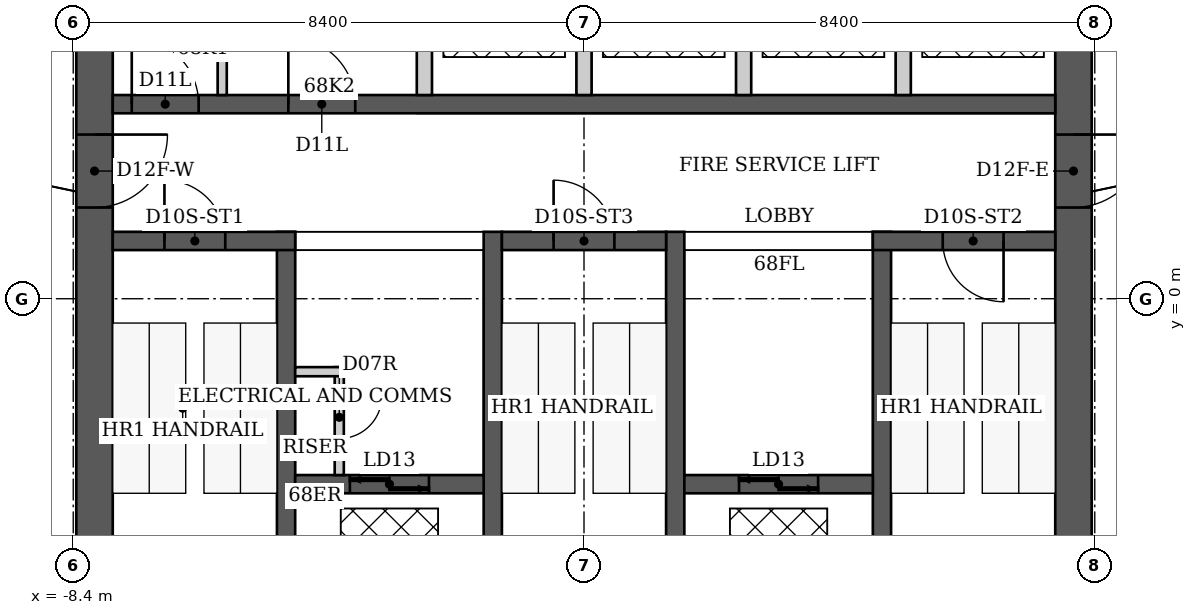
"""IFC4 building model, lengths in metres.
Left out: names, types, materials, properties, quantities, classifications, styles, units other than length and angle.
Written with IfcOpenShell. Run it as: python <this file> out.ifc"""

import sys

from ifc_helpers import new_model, si_unit, direction, frame, frame_2d, origin, place, context, subcontext, project, spatial, rectangle, extrude, element, fill, save


model = new_model("IFC4")
c1 = context("Model", 3, precision=1e-05, world=origin(), true_north=direction((0.0, 1.0)))
c2 = subcontext(c1, "Body", "Model", "MODEL_VIEW")
j1 = project(units=[si_unit("LENGTHUNIT", "METRE"), si_unit("PLANEANGLEUNIT", "RADIAN")], contexts=[c1])
p1 = place(None, origin())
s1 = spatial("IfcSite", under=j1, at=p1, CompositionType="ELEMENT")
p2 = place(p1, origin())
s2 = spatial("IfcBuilding", under=s1, at=p2, CompositionType="ELEMENT")
p3 = place(p2, frame((0.0, 0.0, 272.2)))
s3 = spatial("IfcBuildingStorey", under=s2, at=p3, CompositionType="ELEMENT", Elevation=272.2)
p4 = place(p3, frame((-8.05, -6.1, 0.0), z_axis=(0.0, 0.0, 1.0), x_axis=(0.0, 1.0, 0.0)))
e1 = element("IfcWall", 1, at=p4, inside=s3, PredefinedType="SHEAR", context=c2, shape_type="SweptSolid", body=[
    extrude(rectangle(XDim=12.2, YDim=0.6, at=frame_2d((6.1, 0.0))), origin(), (0.0, 0.0, 1.0), 3.8),
])
p5 = place(p4, frame((7.6, 0.0, 0.0)))
e2 = element("IfcOpeningElement", 2, at=p5, cuts=e1, PredefinedType="OPENING", context=c2, shape_type="SweptSolid", body=[
    extrude(rectangle(XDim=1.2, YDim=2.2, at=frame_2d((0.6, 1.1))), frame((0.0, 0.3, 0.0), z_axis=(0.0, -1.0, 0.0), x_axis=(1.0, 0.0, 0.0)), (0.0, 0.0, 1.0), 0.6),
])
p6 = place(p3, frame((8.05, -6.1, 0.0), z_axis=(0.0, 0.0, 1.0), x_axis=(0.0, 1.0, 0.0)))
e3 = element("IfcWall", 3, at=p6, inside=s3, PredefinedType="SHEAR", context=c2, shape_type="SweptSolid", body=[
    extrude(rectangle(XDim=12.2, YDim=0.6, at=frame_2d((6.1, 0.0))), origin(), (0.0, 0.0, 1.0), 3.8),
])
p7 = place(p6, frame((7.6, 0.0, 0.0)))
e4 = element("IfcOpeningElement", 4, at=p7, cuts=e3, PredefinedType="OPENING", context=c2, shape_type="SweptSolid", body=[
    extrude(rectangle(XDim=1.2, YDim=2.2, at=frame_2d((0.6, 1.1))), frame((0.0, 0.3, 0.0), z_axis=(0.0, -1.0, 0.0), x_axis=(1.0, 0.0, 0.0)), (0.0, 0.0, 1.0), 0.6),
])
for number, where, z_axis, x_axis in (
    (5, (-4.9, -6.1, 0.0), (0.0, 0.0, 1.0), (0.0, 1.0, 0.0)),
    (6, (-1.5, -6.1, 0.0), (0.0, 0.0, 1.0), (0.0, 1.0, 0.0)),
    (7, (1.5, -6.1, 0.0), (0.0, 0.0, 1.0), (0.0, 1.0, 0.0)),
    (8, (4.9, -6.1, 0.0), (0.0, 0.0, 1.0), (0.0, 1.0, 0.0)),
):
    element("IfcWall", number, at=place(p3, frame(where, z_axis=z_axis, x_axis=x_axis)), inside=s3, PredefinedType="SHEAR", context=c2, shape_type="SweptSolid", body=[
        extrude(rectangle(XDim=7.2, YDim=0.3, at=frame_2d((3.6, 0.0))), origin(), (0.0, 0.0, 1.0), 3.8),
    ])
p8 = place(p3, frame((-7.75, 0.95, 0.0), z_axis=(0.0, 0.0, 1.0), x_axis=(1.0, 0.0, 0.0)))
e9 = element("IfcWall", 9, at=p8, inside=s3, PredefinedType="SHEAR", context=c2, shape_type="SweptSolid", body=[
    extrude(rectangle(XDim=3.0, YDim=0.3, at=frame_2d((1.5, 0.0))), origin(), (0.0, 0.0, 1.0), 3.8),
])
p9 = place(p8, frame((0.85, 0.0, 0.0)))
e10 = element("IfcOpeningElement", 10, at=p9, cuts=e9, PredefinedType="OPENING", context=c2, shape_type="SweptSolid", body=[
    extrude(rectangle(XDim=1.0, YDim=2.2, at=frame_2d((0.5, 1.1))), frame((0.0, 0.15, 0.0), z_axis=(0.0, -1.0, 0.0), x_axis=(1.0, 0.0, 0.0)), (0.0, 0.0, 1.0), 0.3),
])
p10 = place(p3, frame((-1.35, 0.95, 0.0), z_axis=(0.0, 0.0, 1.0), x_axis=(1.0, 0.0, 0.0)))
e11 = element("IfcWall", 11, at=p10, inside=s3, PredefinedType="SHEAR", context=c2, shape_type="SweptSolid", body=[
    extrude(rectangle(XDim=2.7, YDim=0.3, at=frame_2d((1.35, 0.0))), origin(), (0.0, 0.0, 1.0), 3.8),
])
p11 = place(p10, frame((0.85, 0.0, 0.0)))
e12 = element("IfcOpeningElement", 12, at=p11, cuts=e11, PredefinedType="OPENING", context=c2, shape_type="SweptSolid", body=[
    extrude(rectangle(XDim=1.0, YDim=2.2, at=frame_2d((0.5, 1.1))), frame((0.0, 0.15, 0.0), z_axis=(0.0, -1.0, 0.0), x_axis=(1.0, 0.0, 0.0)), (0.0, 0.0, 1.0), 0.3),
])
p12 = place(p3, frame((4.75, 0.95, 0.0), z_axis=(0.0, 0.0, 1.0), x_axis=(1.0, 0.0, 0.0)))
e13 = element("IfcWall", 13, at=p12, inside=s3, PredefinedType="SHEAR", context=c2, shape_type="SweptSolid", body=[
    extrude(rectangle(XDim=3.0, YDim=0.3, at=frame_2d((1.5, 0.0))), origin(), (0.0, 0.0, 1.0), 3.8),
])
p13 = place(p12, frame((1.15, 0.0, 0.0)))
e14 = element("IfcOpeningElement", 14, at=p13, cuts=e13, PredefinedType="OPENING", context=c2, shape_type="SweptSolid", body=[
    extrude(rectangle(XDim=1.0, YDim=2.2, at=frame_2d((0.5, 1.1))), frame((0.0, 0.15, 0.0), z_axis=(0.0, -1.0, 0.0), x_axis=(1.0, 0.0, 0.0)), (0.0, 0.0, 1.0), 0.3),
])
p14 = place(p3, frame((-4.75, -3.05, 0.0), z_axis=(0.0, 0.0, 1.0), x_axis=(1.0, 0.0, 0.0)))
e15 = element("IfcWall", 15, at=p14, inside=s3, PredefinedType="SHEAR", context=c2, shape_type="SweptSolid", body=[
    extrude(rectangle(XDim=3.1, YDim=0.3, at=frame_2d((1.55, 0.0))), origin(), (0.0, 0.0, 1.0), 3.8),
])
p15 = place(p14, frame((0.9, 0.0, 0.0)))
e16 = element("IfcOpeningElement", 16, at=p15, cuts=e15, PredefinedType="OPENING", context=c2, shape_type="SweptSolid", body=[
    extrude(rectangle(XDim=1.3, YDim=2.1, at=frame_2d((0.65, 1.05))), frame((0.0, 0.15, 0.0), z_axis=(0.0, -1.0, 0.0), x_axis=(1.0, 0.0, 0.0)), (0.0, 0.0, 1.0), 0.3),
])
p16 = place(p3, frame((1.65, -3.05, 0.0), z_axis=(0.0, 0.0, 1.0), x_axis=(1.0, 0.0, 0.0)))
e17 = element("IfcWall", 17, at=p16, inside=s3, PredefinedType="SHEAR", context=c2, shape_type="SweptSolid", body=[
    extrude(rectangle(XDim=3.1, YDim=0.3, at=frame_2d((1.55, 0.0))), origin(), (0.0, 0.0, 1.0), 3.8),
])
p17 = place(p16, frame((0.9, 0.0, 0.0)))
e18 = element("IfcOpeningElement", 18, at=p17, cuts=e17, PredefinedType="OPENING", context=c2, shape_type="SweptSolid", body=[
    extrude(rectangle(XDim=1.3, YDim=2.1, at=frame_2d((0.65, 1.05))), frame((0.0, 0.15, 0.0), z_axis=(0.0, -1.0, 0.0), x_axis=(1.0, 0.0, 0.0)), (0.0, 0.0, 1.0), 0.3),
])
p18 = place(p3, frame((-7.75, 3.2, 0.0), z_axis=(0.0, 0.0, 1.0), x_axis=(1.0, 0.0, 0.0)))
e19 = element("IfcWall", 19, at=p18, inside=s3, PredefinedType="SHEAR", context=c2, shape_type="SweptSolid", body=[
    extrude(rectangle(XDim=15.5, YDim=0.3, at=frame_2d((7.75, 0.0))), origin(), (0.0, 0.0, 1.0), 3.8),
])
p19 = place(p18, frame((0.312, 0.0, 0.0)))
e20 = element("IfcOpeningElement", 20, at=p19, cuts=e19, PredefinedType="OPENING", context=c2, shape_type="SweptSolid", body=[
    extrude(rectangle(XDim=1.1, YDim=2.2, at=frame_2d((0.55, 1.1))), frame((0.0, 0.15, 0.0), z_axis=(0.0, -1.0, 0.0), x_axis=(1.0, 0.0, 0.0)), (0.0, 0.0, 1.0), 0.3),
])
p20 = place(p18, frame((2.887, 0.0, 0.0)))
e21 = element("IfcOpeningElement", 21, at=p20, cuts=e19, PredefinedType="OPENING", context=c2, shape_type="SweptSolid", body=[
    extrude(rectangle(XDim=1.1, YDim=2.2, at=frame_2d((0.55, 1.1))), frame((0.0, 0.15, 0.0), z_axis=(0.0, -1.0, 0.0), x_axis=(1.0, 0.0, 0.0)), (0.0, 0.0, 1.0), 0.3),
])
for number, where, z_axis, x_axis in (
    (22, (-2.625, 3.35, 0.0), (0.0, 0.0, 1.0), (0.0, 1.0, 0.0)),
    (23, (0.0, 3.35, 0.0), (0.0, 0.0, 1.0), (0.0, 1.0, 0.0)),
    (24, (2.625, 3.35, 0.0), (0.0, 0.0, 1.0), (0.0, 1.0, 0.0)),
    (25, (5.25, 3.35, 0.0), (0.0, 0.0, 1.0), (0.0, 1.0, 0.0)),
):
    element("IfcWall", number, at=place(p3, frame(where, z_axis=z_axis, x_axis=x_axis)), inside=s3, PredefinedType="PARTITIONING", context=c2, shape_type="SweptSolid", body=[
        extrude(rectangle(XDim=2.75, YDim=0.25, at=frame_2d((1.375, 0.0))), origin(), (0.0, 0.0, 1.0), 3.8),
    ])
p21 = place(p3, frame((-4.025, -2.9, 0.0), z_axis=(0.0, 0.0, 1.0), x_axis=(0.0, 1.0, 0.0)))
e26 = element("IfcWall", 26, at=p21, inside=s3, PredefinedType="PARTITIONING", context=c2, shape_type="SweptSolid", body=[
    extrude(rectangle(XDim=1.775, YDim=0.15, at=frame_2d((0.887, 0.0))), origin(), (0.0, 0.0, 1.0), 3.64),
])
p22 = place(p21, frame((0.6, 0.0, 0.0)))
e27 = element("IfcOpeningElement", 27, at=p22, cuts=e26, PredefinedType="OPENING", context=c2, shape_type="SweptSolid", body=[
    extrude(rectangle(XDim=0.7, YDim=2.1, at=frame_2d((0.35, 1.05))), frame((0.0, 0.075, 0.0), z_axis=(0.0, -1.0, 0.0), x_axis=(1.0, 0.0, 0.0)), (0.0, 0.0, 1.0), 0.15),
])
p23 = place(p3, frame((-4.75, -1.2, 0.0), z_axis=(0.0, 0.0, 1.0), x_axis=(1.0, 0.0, 0.0)))
e28 = element("IfcWall", 28, at=p23, inside=s3, PredefinedType="PARTITIONING", context=c2, shape_type="SweptSolid", body=[
    extrude(rectangle(XDim=0.8, YDim=0.15, at=frame_2d((0.4, 0.0))), origin(), (0.0, 0.0, 1.0), 3.64),
])
p24 = place(p3, frame((-5.95, 3.35, 0.0), z_axis=(0.0, 0.0, 1.0), x_axis=(0.0, 1.0, 0.0)))
e29 = element("IfcWall", 29, at=p24, inside=s3, PredefinedType="PARTITIONING", context=c2, shape_type="SweptSolid", body=[
    extrude(rectangle(XDim=2.75, YDim=0.15, at=frame_2d((1.375, 0.0))), origin(), (0.0, 0.0, 1.0), 3.64),
])
p25 = place(p9, origin())
e30 = element("IfcDoor", 30, at=p25, inside=s3, OperationType="SINGLE_SWING_LEFT", PredefinedType="DOOR", context=c2, shape_type="SweptSolid", body=[
    extrude(rectangle(XDim=1.0, YDim=2.2, at=frame_2d((0.5, 1.1))), frame((0.0, 0.025, 0.0), z_axis=(0.0, -1.0, 0.0), x_axis=(1.0, 0.0, 0.0)), (0.0, 0.0, 1.0), 0.05),
])
fill(e10, e30)
p26 = place(p11, origin())
e31 = element("IfcDoor", 31, at=p26, inside=s3, OperationType="SINGLE_SWING_LEFT", PredefinedType="DOOR", context=c2, shape_type="SweptSolid", body=[
    extrude(rectangle(XDim=1.0, YDim=2.2, at=frame_2d((0.5, 1.1))), frame((0.0, 0.025, 0.0), z_axis=(0.0, -1.0, 0.0), x_axis=(1.0, 0.0, 0.0)), (0.0, 0.0, 1.0), 0.05),
])
fill(e12, e31)
p27 = place(p13, origin())
e32 = element("IfcDoor", 32, at=p27, inside=s3, OperationType="SINGLE_SWING_RIGHT", PredefinedType="DOOR", context=c2, shape_type="SweptSolid", body=[
    extrude(rectangle(XDim=1.0, YDim=2.2, at=frame_2d((0.5, 1.1))), frame((0.0, 0.025, 0.0), z_axis=(0.0, -1.0, 0.0), x_axis=(1.0, 0.0, 0.0)), (0.0, 0.0, 1.0), 0.05),
])
fill(e14, e32)
p28 = place(p5, origin())
e33 = element("IfcDoor", 33, at=p28, inside=s3, OperationType="SINGLE_SWING_RIGHT", PredefinedType="DOOR", context=c2, shape_type="SweptSolid", body=[
    extrude(rectangle(XDim=1.2, YDim=2.2, at=frame_2d((0.6, 1.1))), frame((0.0, 0.025, 0.0), z_axis=(0.0, -1.0, 0.0), x_axis=(1.0, 0.0, 0.0)), (0.0, 0.0, 1.0), 0.05),
])
fill(e2, e33)
p29 = place(p7, origin())
e34 = element("IfcDoor", 34, at=p29, inside=s3, OperationType="SINGLE_SWING_RIGHT", PredefinedType="DOOR", context=c2, shape_type="SweptSolid", body=[
    extrude(rectangle(XDim=1.2, YDim=2.2, at=frame_2d((0.6, 1.1))), frame((0.0, 0.025, 0.0), z_axis=(0.0, -1.0, 0.0), x_axis=(1.0, 0.0, 0.0)), (0.0, 0.0, 1.0), 0.05),
])
fill(e4, e34)
p30 = place(p22, origin())
e35 = element("IfcDoor", 35, at=p30, inside=s3, OperationType="SINGLE_SWING_RIGHT", PredefinedType="DOOR", context=c2, shape_type="SweptSolid", body=[
    extrude(rectangle(XDim=0.7, YDim=2.1, at=frame_2d((0.35, 1.05))), frame((0.0, 0.025, 0.0), z_axis=(0.0, -1.0, 0.0), x_axis=(1.0, 0.0, 0.0)), (0.0, 0.0, 1.0), 0.05),
])
fill(e27, e35)
p31 = place(p19, origin())
e36 = element("IfcDoor", 36, at=p31, inside=s3, OperationType="SINGLE_SWING_LEFT", PredefinedType="DOOR", context=c2, shape_type="SweptSolid", body=[
    extrude(rectangle(XDim=1.1, YDim=2.2, at=frame_2d((0.55, 1.1))), frame((0.0, 0.025, 0.0), z_axis=(0.0, -1.0, 0.0), x_axis=(1.0, 0.0, 0.0)), (0.0, 0.0, 1.0), 0.05),
])
fill(e20, e36)
p32 = place(p20, origin())
e37 = element("IfcDoor", 37, at=p32, inside=s3, OperationType="SINGLE_SWING_LEFT", PredefinedType="DOOR", context=c2, shape_type="SweptSolid", body=[
    extrude(rectangle(XDim=1.1, YDim=2.2, at=frame_2d((0.55, 1.1))), frame((0.0, 0.025, 0.0), z_axis=(0.0, -1.0, 0.0), x_axis=(1.0, 0.0, 0.0)), (0.0, 0.0, 1.0), 0.05),
])
fill(e21, e37)
p33 = place(p15, origin())
e38 = element("IfcDoor", 38, at=p33, inside=s3, OperationType="DOUBLE_DOOR_SLIDING", PredefinedType="DOOR", context=c2, shape_type="SweptSolid", body=[
    extrude(rectangle(XDim=1.3, YDim=2.1, at=frame_2d((0.65, 1.05))), frame((0.0, 0.025, 0.0), z_axis=(0.0, -1.0, 0.0), x_axis=(1.0, 0.0, 0.0)), (0.0, 0.0, 1.0), 0.05),
])
fill(e16, e38)
p34 = place(p17, origin())
e39 = element("IfcDoor", 39, at=p34, inside=s3, OperationType="DOUBLE_DOOR_SLIDING", PredefinedType="DOOR", context=c2, shape_type="SweptSolid", body=[
    extrude(rectangle(XDim=1.3, YDim=2.1, at=frame_2d((0.65, 1.05))), frame((0.0, 0.025, 0.0), z_axis=(0.0, -1.0, 0.0), x_axis=(1.0, 0.0, 0.0)), (0.0, 0.0, 1.0), 0.05),
])
fill(e18, e39)
save(model, sys.argv[1])
